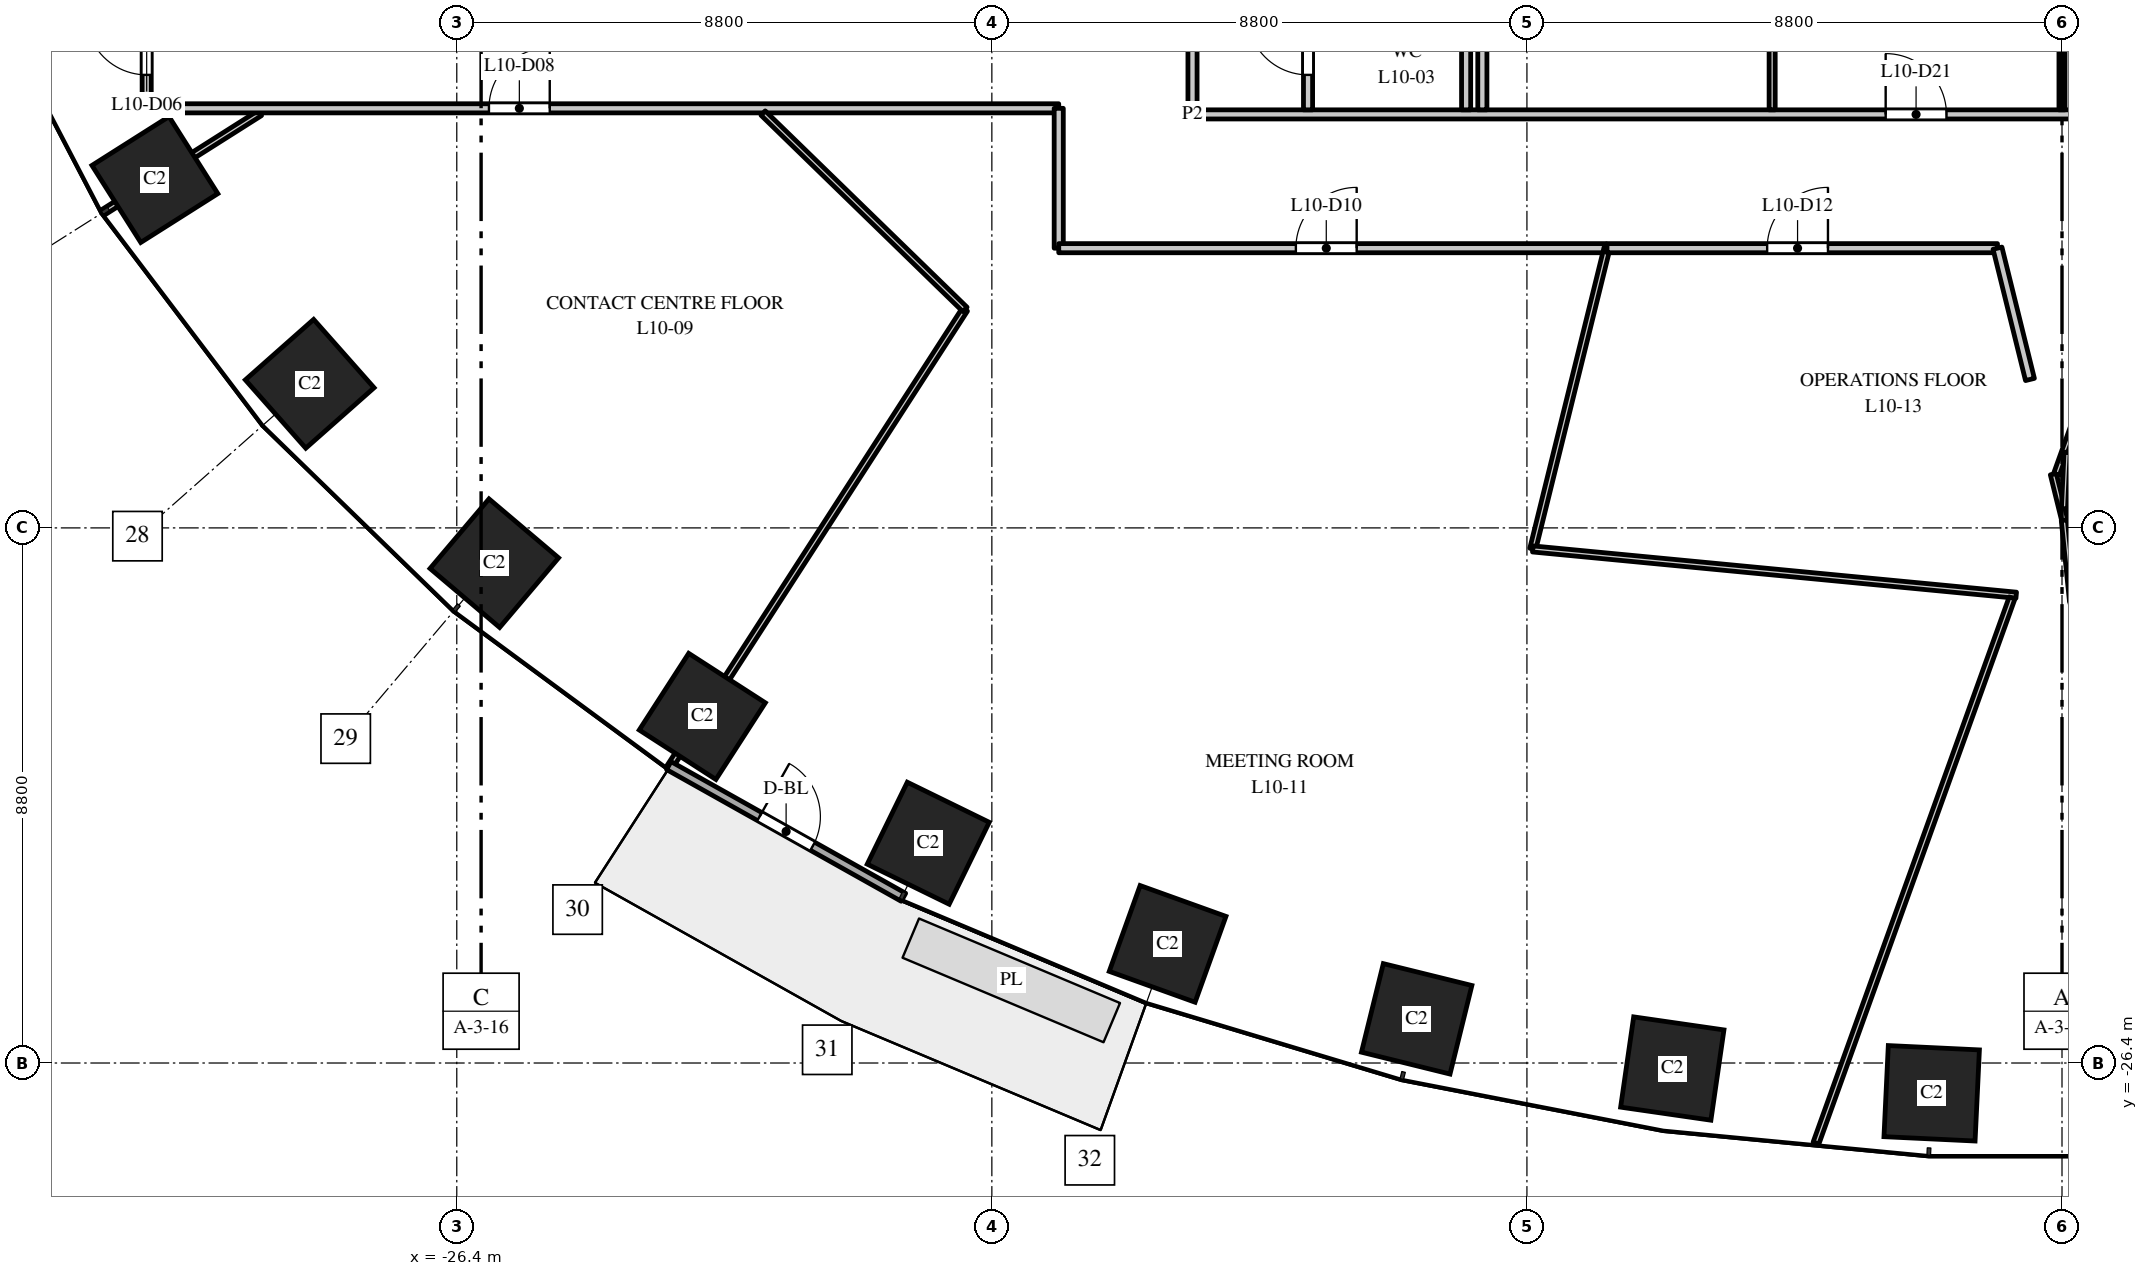
"""IFC4 building model, lengths in metres.
Left out: names, types, materials, properties, quantities, classifications, styles, units other than length and angle.
Written with IfcOpenShell. Run it as: python <this file> out.ifc"""

import sys

from ifc_helpers import new_model, si_unit, direction, frame, frame_2d, origin, origin_2d, place, context, subcontext, project, spatial, rectangle, extrude, element, fill, save


model = new_model("IFC4")
c1 = context("Model", 3, precision=1e-05, world=origin(), true_north=direction((0.0, 1.0)))
c2 = subcontext(c1, "Body", "Model", "MODEL_VIEW")
j1 = project(units=[si_unit("LENGTHUNIT", "METRE"), si_unit("PLANEANGLEUNIT", "RADIAN")], contexts=[c1])
p1 = place(None, origin())
s1 = spatial("IfcSite", under=j1, at=p1, CompositionType="ELEMENT")
p2 = place(p1, origin())
s2 = spatial("IfcBuilding", under=s1, at=p2, CompositionType="ELEMENT")
p3 = place(p2, frame((0.0, 0.0, 50.5)))
s3 = spatial("IfcBuildingStorey", under=s2, at=p3, CompositionType="ELEMENT", Elevation=50.5)
for number, where, z_axis, x_axis in (
    (1, (-31.365, -11.871, 0.0), (0.0, 0.0, 1.0), (0.535, -0.845, 0.0)),
    (2, (-28.819, -15.23, 0.0), (0.0, 0.0, 1.0), (0.663, -0.749, 0.0)),
    (3, (-25.783, -18.18, 0.0), (0.0, 0.0, 1.0), (0.763, -0.646, 0.0)),
    (4, (-22.362, -20.7, 0.0), (0.0, 0.0, 1.0), (0.84, -0.542, 0.0)),
    (5, (-18.646, -22.785, 0.0), (0.0, 0.0, 1.0), (0.898, -0.439, 0.0)),
    (6, (-14.709, -24.441, 0.0), (0.0, 0.0, 1.0), (0.941, -0.338, 0.0)),
    (7, (-10.613, -25.674, 0.0), (0.0, 0.0, 1.0), (0.971, -0.24, 0.0)),
    (8, (-6.409, -26.491, 0.0), (0.0, 0.0, 1.0), (0.99, -0.143, 0.0)),
    (9, (-2.143, -26.898, 0.0), (0.0, 0.0, 1.0), (0.999, -0.048, 0.0)),
):
    element("IfcColumn", number, at=place(p3, frame(where, z_axis=z_axis, x_axis=x_axis)), inside=s3, PredefinedType="COLUMN", context=c2, shape_type="SweptSolid", body=[
        extrude(rectangle(XDim=1.5, YDim=1.5, at=origin_2d()), origin(), (0.0, 0.0, 1.0), 4.0),
    ])
p4 = place(p3, frame((-22.913, -21.509, 0.0), z_axis=(0.0, 0.0, 1.0), x_axis=(0.872046572975, -0.489422899509, 0.0)))
e10 = element("IfcWall", 10, at=p4, inside=s3, PredefinedType="STANDARD", context=c2, shape_type="SweptSolid", body=[
    extrude(rectangle(XDim=4.426, YDim=0.15, at=frame_2d((2.213, 0.0))), origin(), (0.0, 0.0, 1.0), 3.7),
])
p5 = place(p4, frame((1.713, 0.0, 0.0)))
e11 = element("IfcOpeningElement", 11, at=p5, cuts=e10, PredefinedType="OPENING", context=c2, shape_type="SweptSolid", body=[
    extrude(rectangle(XDim=1.0, YDim=2.4, at=frame_2d((0.5, 1.2))), frame((0.0, 0.085, 0.0), z_axis=(0.0, -1.0, 0.0), x_axis=(1.0, 0.0, 0.0)), (0.0, 0.0, 1.0), 0.17),
])
p6 = place(p3, frame((-32.212, -12.408, 0.0), z_axis=(0.0, 0.0, 1.0), x_axis=(0.844810627195, 0.535065420467, 0.0)))
e12 = element("IfcWall", 12, at=p6, inside=s3, PredefinedType="PARTITIONING", context=c2, shape_type="SweptSolid", body=[
    extrude(rectangle(XDim=3.048, YDim=0.1, at=frame_2d((1.524, 0.0))), origin(), (0.0, 0.0, 1.0), 3.7),
])
p7 = place(p3, frame((-31.5, -10.7, 0.0), z_axis=(0.0, 0.0, 1.0), x_axis=(0.0, 1.0, 0.0)))
e13 = element("IfcWall", 13, at=p7, inside=s3, PredefinedType="PARTITIONING", context=c2, shape_type="SweptSolid", body=[
    extrude(rectangle(XDim=2.2, YDim=0.15, at=frame_2d((1.1, 0.0))), origin(), (0.0, 0.0, 1.0), 3.7),
])
p8 = place(p7, frame((0.55, 0.0, 0.0)))
e14 = element("IfcOpeningElement", 14, at=p8, cuts=e13, PredefinedType="OPENING", context=c2, shape_type="SweptSolid", body=[
    extrude(rectangle(XDim=1.0, YDim=2.1, at=frame_2d((0.5, 1.05))), frame((0.0, 0.085, 0.0), z_axis=(0.0, -1.0, 0.0), x_axis=(1.0, 0.0, 0.0)), (0.0, 0.0, 1.0), 0.17),
])
p9 = place(p3, frame((-31.5, -10.7, 0.0), z_axis=(0.0, 0.0, 1.0), x_axis=(1.0, 0.0, 0.0)))
e15 = element("IfcWall", 15, at=p9, inside=s3, PredefinedType="PARTITIONING", context=c2, shape_type="SweptSolid", body=[
    extrude(rectangle(XDim=15.0, YDim=0.15, at=frame_2d((7.5, 0.0))), origin(), (0.0, 0.0, 1.0), 3.1),
])
p10 = place(p9, frame((5.629, 0.0, 0.0)))
e16 = element("IfcOpeningElement", 16, at=p10, cuts=e15, PredefinedType="OPENING", context=c2, shape_type="SweptSolid", body=[
    extrude(rectangle(XDim=1.0, YDim=2.1, at=frame_2d((0.5, 1.05))), frame((0.0, 0.085, 0.0), z_axis=(0.0, -1.0, 0.0), x_axis=(1.0, 0.0, 0.0)), (0.0, 0.0, 1.0), 0.17),
])
p11 = place(p3, frame((-22.905, -21.542, 0.0), z_axis=(0.0, 0.0, 1.0), x_axis=(0.542241597628, 0.840222619192, 0.0)))
e17 = element("IfcWall", 17, at=p11, inside=s3, PredefinedType="PARTITIONING", context=c2, shape_type="SweptSolid", body=[
    extrude(rectangle(XDim=8.967, YDim=0.1, at=frame_2d((4.483, 0.0))), origin(), (0.0, 0.0, 1.0), 2.85),
])
p12 = place(p3, frame((-21.362, -10.778, 0.0), z_axis=(0.0, 0.0, 1.0), x_axis=(0.716869759063, -0.697207105917, 0.0)))
e18 = element("IfcWall", 18, at=p12, inside=s3, PredefinedType="PARTITIONING", context=c2, shape_type="SweptSolid", body=[
    extrude(rectangle(XDim=4.631, YDim=0.1, at=frame_2d((2.316, 0.0))), origin(), (0.0, 0.0, 1.0), 2.75),
])
p13 = place(p3, frame((-16.5, -13.0, 0.0), z_axis=(0.0, 0.0, 1.0), x_axis=(0.0, 1.0, 0.0)))
e19 = element("IfcWall", 19, at=p13, inside=s3, PredefinedType="PARTITIONING", context=c2, shape_type="SweptSolid", body=[
    extrude(rectangle(XDim=2.3, YDim=0.15, at=frame_2d((1.15, 0.0))), origin(), (0.0, 0.0, 1.0), 2.75),
])
p14 = place(p3, frame((-16.5, -13.0, 0.0), z_axis=(0.0, 0.0, 1.0), x_axis=(1.0, 0.0, 0.0)))
e20 = element("IfcWall", 20, at=p14, inside=s3, PredefinedType="PARTITIONING", context=c2, shape_type="SweptSolid", body=[
    extrude(rectangle(XDim=9.001, YDim=0.15, at=frame_2d((4.5, 0.0))), origin(), (0.0, 0.0, 1.0), 2.85),
])
p15 = place(p14, frame((3.9, 0.0, 0.0)))
e21 = element("IfcOpeningElement", 21, at=p15, cuts=e20, PredefinedType="OPENING", context=c2, shape_type="SweptSolid", body=[
    extrude(rectangle(XDim=1.0, YDim=2.1, at=frame_2d((0.5, 1.05))), frame((0.0, 0.085, 0.0), z_axis=(0.0, -1.0, 0.0), x_axis=(1.0, 0.0, 0.0)), (0.0, 0.0, 1.0), 0.17),
])
p16 = place(p3, frame((-14.3, -10.8, 0.0), z_axis=(0.0, 0.0, 1.0), x_axis=(0.0, 1.0, 0.0)))
e22 = element("IfcWall", 22, at=p16, inside=s3, PredefinedType="PARTITIONING", context=c2, shape_type="SweptSolid", body=[
    extrude(rectangle(XDim=21.6, YDim=0.15, at=frame_2d((10.8, 0.0))), origin(), (0.0, 0.0, 1.0), 2.75),
])
p17 = place(p16, frame((10.4, 0.0, 0.0)))
e23 = element("IfcOpeningElement", 23, at=p17, cuts=e22, PredefinedType="OPENING", context=c2, shape_type="SweptSolid", body=[
    extrude(rectangle(XDim=1.0, YDim=2.1, at=frame_2d((0.5, 1.05))), frame((0.0, 0.085, 0.0), z_axis=(0.0, -1.0, 0.0), x_axis=(1.0, 0.0, 0.0)), (0.0, 0.0, 1.0), 0.17),
])
p18 = place(p3, frame((-14.3, -10.8, 0.0), z_axis=(0.0, 0.0, 1.0), x_axis=(1.0, 0.0, 0.0)))
e24 = element("IfcWall", 24, at=p18, inside=s3, PredefinedType="PARTITIONING", context=c2, shape_type="SweptSolid", body=[
    extrude(rectangle(XDim=28.6, YDim=0.15, at=frame_2d((14.3, 0.0))), origin(), (0.0, 0.0, 1.0), 2.85),
])
p19 = place(p18, frame((11.4, 0.0, 0.0)))
e25 = element("IfcOpeningElement", 25, at=p19, cuts=e24, PredefinedType="OPENING", context=c2, shape_type="SweptSolid", body=[
    extrude(rectangle(XDim=1.0, YDim=2.1, at=frame_2d((0.5, 1.05))), frame((0.0, 0.085, 0.0), z_axis=(0.0, -1.0, 0.0), x_axis=(1.0, 0.0, 0.0)), (0.0, 0.0, 1.0), 0.17),
])
p20 = place(p18, frame((16.167, 0.0, 0.0)))
e26 = element("IfcOpeningElement", 26, at=p20, cuts=e24, PredefinedType="OPENING", context=c2, shape_type="SweptSolid", body=[
    extrude(rectangle(XDim=1.0, YDim=2.1, at=frame_2d((0.5, 1.05))), frame((0.0, 0.085, 0.0), z_axis=(0.0, -1.0, 0.0), x_axis=(1.0, 0.0, 0.0)), (0.0, 0.0, 1.0), 0.17),
])
p21 = place(p3, frame((-12.4, -10.725, 0.0), z_axis=(0.0, 0.0, 1.0), x_axis=(0.0, 1.0, 0.0)))
e27 = element("IfcWall", 27, at=p21, inside=s3, PredefinedType="PARTITIONING", context=c2, shape_type="SweptSolid", body=[
    extrude(rectangle(XDim=7.065, YDim=0.15, at=frame_2d((3.533, 0.0))), origin(), (0.0, 0.0, 1.0), 2.75),
])
p22 = place(p21, frame((0.575, 0.0, 0.0)))
e28 = element("IfcOpeningElement", 28, at=p22, cuts=e27, PredefinedType="OPENING", context=c2, shape_type="SweptSolid", body=[
    extrude(rectangle(XDim=1.0, YDim=2.1, at=frame_2d((0.5, 1.05))), frame((0.0, 0.085, 0.0), z_axis=(0.0, -1.0, 0.0), x_axis=(1.0, 0.0, 0.0)), (0.0, 0.0, 1.0), 0.17),
])
p23 = place(p21, frame((3.095, 0.0, 0.0)))
e29 = element("IfcOpeningElement", 29, at=p23, cuts=e27, PredefinedType="OPENING", context=c2, shape_type="SweptSolid", body=[
    extrude(rectangle(XDim=1.0, YDim=2.1, at=frame_2d((0.5, 1.05))), frame((0.0, 0.085, 0.0), z_axis=(0.0, -1.0, 0.0), x_axis=(1.0, 0.0, 0.0)), (0.0, 0.0, 1.0), 0.17),
])
p24 = place(p21, frame((5.447, 0.0, 0.0)))
e30 = element("IfcOpeningElement", 30, at=p24, cuts=e27, PredefinedType="OPENING", context=c2, shape_type="SweptSolid", body=[
    extrude(rectangle(XDim=1.0, YDim=2.1, at=frame_2d((0.5, 1.05))), frame((0.0, 0.085, 0.0), z_axis=(0.0, -1.0, 0.0), x_axis=(1.0, 0.0, 0.0)), (0.0, 0.0, 1.0), 0.17),
])
p25 = place(p3, frame((-9.8, -10.725, 0.0), z_axis=(0.0, 0.0, 1.0), x_axis=(0.0, 1.0, 0.0)))
e31 = element("IfcWall", 31, at=p25, inside=s3, PredefinedType="PARTITIONING", context=c2, shape_type="SweptSolid", body=[
    extrude(rectangle(XDim=7.065, YDim=0.15, at=frame_2d((3.533, 0.0))), origin(), (0.0, 0.0, 1.0), 2.75),
])
p26 = place(p3, frame((-9.533, -10.725, 0.0), z_axis=(0.0, 0.0, 1.0), x_axis=(0.0, 1.0, 0.0)))
e32 = element("IfcWall", 32, at=p26, inside=s3, PredefinedType="PARTITIONING", context=c2, shape_type="SweptSolid", body=[
    extrude(rectangle(XDim=21.45, YDim=0.15, at=frame_2d((10.725, 0.0))), origin(), (0.0, 0.0, 1.0), 2.75),
])
p27 = place(p26, frame((15.575, 0.0, 0.0)))
e33 = element("IfcOpeningElement", 33, at=p27, cuts=e32, PredefinedType="OPENING", context=c2, shape_type="SweptSolid", body=[
    extrude(rectangle(XDim=1.0, YDim=2.1, at=frame_2d((0.5, 1.05))), frame((0.0, 0.085, 0.0), z_axis=(0.0, -1.0, 0.0), x_axis=(1.0, 0.0, 0.0)), (0.0, 0.0, 1.0), 0.17),
])
p28 = place(p3, frame((-8.704, -17.946, 0.0), z_axis=(0.0, 0.0, 1.0), x_axis=(0.239704393154, 0.970845921814, 0.0)))
e34 = element("IfcWall", 34, at=p28, inside=s3, PredefinedType="PARTITIONING", context=c2, shape_type="SweptSolid", body=[
    extrude(rectangle(XDim=5.094, YDim=0.1, at=frame_2d((2.547, 0.0))), origin(), (0.0, 0.0, 1.0), 3.7),
])
p29 = place(p3, frame((-8.704, -17.946, 0.0), z_axis=(0.0, 0.0, 1.0), x_axis=(0.995451268437, -0.095272095422, 0.0)))
e35 = element("IfcWall", 35, at=p29, inside=s3, PredefinedType="PARTITIONING", context=c2, shape_type="SweptSolid", body=[
    extrude(rectangle(XDim=7.988, YDim=0.1, at=frame_2d((3.994, 0.0))), origin(), (0.0, 0.0, 1.0), 2.85),
])
p30 = place(p3, frame((-7.483, -13.0, 0.0), z_axis=(0.0, 0.0, 1.0), x_axis=(1.0, 0.0, 0.0)))
e36 = element("IfcWall", 36, at=p30, inside=s3, PredefinedType="PARTITIONING", context=c2, shape_type="SweptSolid", body=[
    extrude(rectangle(XDim=6.422, YDim=0.15, at=frame_2d((3.211, 0.0))), origin(), (0.0, 0.0, 1.0), 2.85),
])
p31 = place(p30, frame((2.634, 0.0, 0.0)))
e37 = element("IfcOpeningElement", 37, at=p31, cuts=e36, PredefinedType="OPENING", context=c2, shape_type="SweptSolid", body=[
    extrude(rectangle(XDim=1.0, YDim=2.1, at=frame_2d((0.5, 1.05))), frame((0.0, 0.085, 0.0), z_axis=(0.0, -1.0, 0.0), x_axis=(1.0, 0.0, 0.0)), (0.0, 0.0, 1.0), 0.17),
])
p32 = place(p3, frame((-4.767, -10.725, 0.0), z_axis=(0.0, 0.0, 1.0), x_axis=(0.0, 1.0, 0.0)))
e38 = element("IfcWall", 38, at=p32, inside=s3, PredefinedType="PARTITIONING", context=c2, shape_type="SweptSolid", body=[
    extrude(rectangle(XDim=4.362, YDim=0.1, at=frame_2d((2.181, 0.0))), origin(), (0.0, 0.0, 1.0), 2.85),
])
p33 = place(p3, frame((-4.046, -27.717, 0.0), z_axis=(0.0, 0.0, 1.0), x_axis=(0.338447260677, 0.940985362129, 0.0)))
e39 = element("IfcWall", 39, at=p33, inside=s3, PredefinedType="PARTITIONING", context=c2, shape_type="SweptSolid", body=[
    extrude(rectangle(XDim=9.528, YDim=0.1, at=frame_2d((4.764, 0.0))), origin(), (0.0, 0.0, 1.0), 2.85),
])
p34 = place(p3, frame((-1.061, -13.0, 0.0), z_axis=(0.0, 0.0, 1.0), x_axis=(0.240081023427, -0.9707528533, 0.0)))
e40 = element("IfcWall", 40, at=p34, inside=s3, PredefinedType="PARTITIONING", context=c2, shape_type="SweptSolid", body=[
    extrude(rectangle(XDim=2.224, YDim=0.15, at=frame_2d((1.112, 0.0))), origin(), (0.0, 0.0, 1.0), 2.85),
])
p35 = place(p3, frame((-0.143, -16.715, 0.0), z_axis=(0.0, 0.0, 1.0), x_axis=(0.23958475997, -0.970875451739, 0.0)))
e41 = element("IfcWall", 41, at=p35, inside=s3, PredefinedType="PARTITIONING", context=c2, shape_type="SweptSolid", body=[
    extrude(rectangle(XDim=0.876, YDim=0.1, at=frame_2d((0.438, 0.0))), origin(), (0.0, 0.0, 1.0), 3.7),
])
p36 = place(p3, frame((-0.09, -16.718, 0.0), z_axis=(0.0, 0.0, 1.0), x_axis=(0.3382216124, 0.941066491225, 0.0)))
e42 = element("IfcWall", 42, at=p36, inside=s3, PredefinedType="PARTITIONING", context=c2, shape_type="SweptSolid", body=[
    extrude(rectangle(XDim=1.771, YDim=0.1, at=frame_2d((0.886, 0.0))), origin(), (0.0, 0.0, 1.0), 3.7),
])
p37 = place(p3, frame((0.0, -10.725, 0.0), z_axis=(0.0, 0.0, 1.0), x_axis=(0.0, 1.0, 0.0)))
e43 = element("IfcWall", 43, at=p37, inside=s3, PredefinedType="PARTITIONING", context=c2, shape_type="SweptSolid", body=[
    extrude(rectangle(XDim=3.221, YDim=0.1, at=frame_2d((1.611, 0.0))), origin(), (0.0, 0.0, 1.0), 3.7),
])
p38 = place(p3, frame((0.04, -17.284, 0.0), z_axis=(0.0, 0.0, 1.0), x_axis=(0.047302948177, 0.998880589006, 0.0)))
e44 = element("IfcWall", 44, at=p38, inside=s3, PredefinedType="PARTITIONING", context=c2, shape_type="SweptSolid", body=[
    extrude(rectangle(XDim=0.929, YDim=0.1, at=frame_2d((0.464, 0.0))), origin(), (0.0, 0.0, 1.0), 3.7),
])
p39 = place(p3, frame((0.038, -17.474, 0.0), z_axis=(0.0, 0.0, 1.0), x_axis=(0.100886401076, -0.99489795159, 0.0)))
e45 = element("IfcWall", 45, at=p39, inside=s3, PredefinedType="PARTITIONING", context=c2, shape_type="SweptSolid", body=[
    extrude(rectangle(XDim=1.329, YDim=0.1, at=frame_2d((0.664, 0.0))), origin(), (0.0, 0.0, 1.0), 3.7),
])
p40 = place(p5, origin())
e46 = element("IfcDoor", 46, at=p40, inside=s3, OperationType="SINGLE_SWING_LEFT", PredefinedType="DOOR", context=c2, shape_type="SweptSolid", body=[
    extrude(rectangle(XDim=1.0, YDim=2.4, at=frame_2d((0.5, 1.2))), frame((0.0, 0.025, 0.0), z_axis=(0.0, -1.0, 0.0), x_axis=(1.0, 0.0, 0.0)), (0.0, 0.0, 1.0), 0.05),
])
fill(e11, e46)
p41 = place(p22, origin())
e47 = element("IfcDoor", 47, at=p41, inside=s3, OperationType="SINGLE_SWING_RIGHT", PredefinedType="DOOR", context=c2, shape_type="SweptSolid", body=[
    extrude(rectangle(XDim=1.0, YDim=2.1, at=frame_2d((0.5, 1.05))), frame((0.0, 0.025, 0.0), z_axis=(0.0, -1.0, 0.0), x_axis=(1.0, 0.0, 0.0)), (0.0, 0.0, 1.0), 0.05),
])
fill(e28, e47)
p42 = place(p8, origin())
e48 = element("IfcDoor", 48, at=p42, inside=s3, OperationType="SINGLE_SWING_RIGHT", PredefinedType="DOOR", context=c2, shape_type="SweptSolid", body=[
    extrude(rectangle(XDim=1.0, YDim=2.1, at=frame_2d((0.5, 1.05))), frame((0.0, 0.025, 0.0), z_axis=(0.0, -1.0, 0.0), x_axis=(1.0, 0.0, 0.0)), (0.0, 0.0, 1.0), 0.05),
])
fill(e14, e48)
p43 = place(p10, origin())
e49 = element("IfcDoor", 49, at=p43, inside=s3, OperationType="SINGLE_SWING_RIGHT", PredefinedType="DOOR", context=c2, shape_type="SweptSolid", body=[
    extrude(rectangle(XDim=1.0, YDim=2.1, at=frame_2d((0.5, 1.05))), frame((0.0, 0.025, 0.0), z_axis=(0.0, -1.0, 0.0), x_axis=(1.0, 0.0, 0.0)), (0.0, 0.0, 1.0), 0.05),
])
fill(e16, e49)
p44 = place(p15, origin())
e50 = element("IfcDoor", 50, at=p44, inside=s3, OperationType="SINGLE_SWING_RIGHT", PredefinedType="DOOR", context=c2, shape_type="SweptSolid", body=[
    extrude(rectangle(XDim=1.0, YDim=2.1, at=frame_2d((0.5, 1.05))), frame((0.0, 0.025, 0.0), z_axis=(0.0, -1.0, 0.0), x_axis=(1.0, 0.0, 0.0)), (0.0, 0.0, 1.0), 0.05),
])
fill(e21, e50)
p45 = place(p31, origin())
e51 = element("IfcDoor", 51, at=p45, inside=s3, OperationType="SINGLE_SWING_RIGHT", PredefinedType="DOOR", context=c2, shape_type="SweptSolid", body=[
    extrude(rectangle(XDim=1.0, YDim=2.1, at=frame_2d((0.5, 1.05))), frame((0.0, 0.025, 0.0), z_axis=(0.0, -1.0, 0.0), x_axis=(1.0, 0.0, 0.0)), (0.0, 0.0, 1.0), 0.05),
])
fill(e37, e51)
p46 = place(p19, origin())
e52 = element("IfcDoor", 52, at=p46, inside=s3, OperationType="SINGLE_SWING_LEFT", PredefinedType="DOOR", context=c2, shape_type="SweptSolid", body=[
    extrude(rectangle(XDim=1.0, YDim=2.1, at=frame_2d((0.5, 1.05))), frame((0.0, 0.025, 0.0), z_axis=(0.0, -1.0, 0.0), x_axis=(1.0, 0.0, 0.0)), (0.0, 0.0, 1.0), 0.05),
])
fill(e25, e52)
save(model, sys.argv[1])
